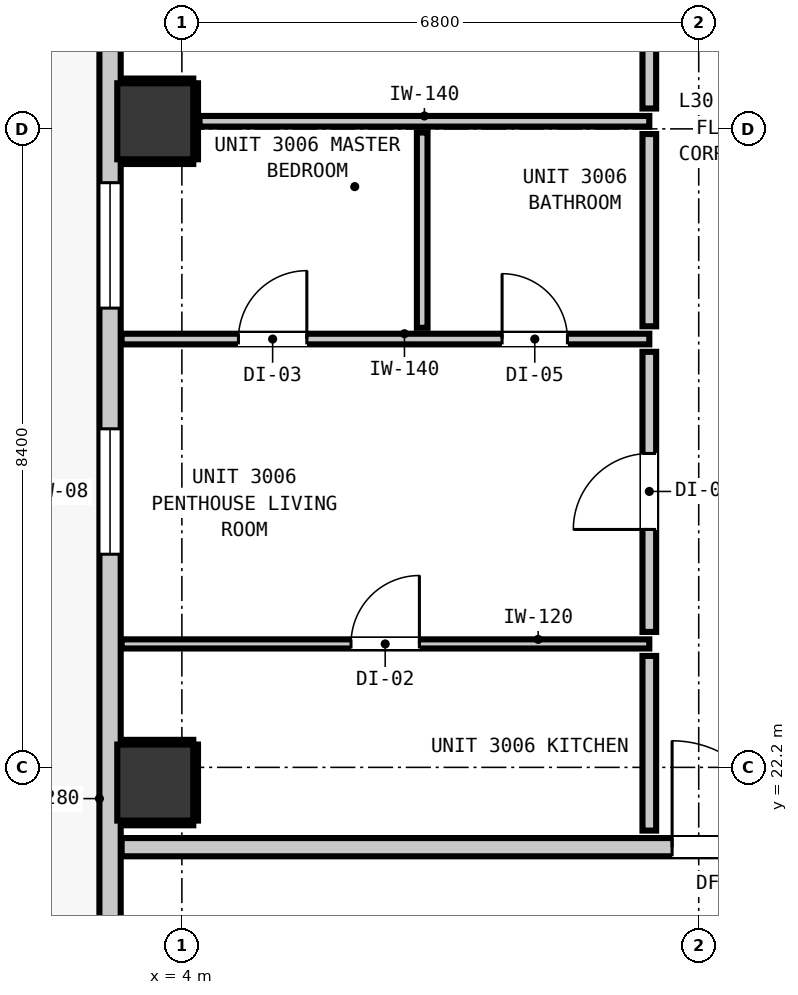
"""IFC4 building model, lengths in metres.
Left out: names, types, materials, properties, quantities, classifications, styles, units other than length and angle.
Written with IfcOpenShell. Run it as: python <this file> out.ifc"""

import sys

from ifc_helpers import new_model, si_unit, direction, frame, frame_2d, origin, origin_2d, place, context, subcontext, project, spatial, rectangle, extrude, element, fill, save


model = new_model("IFC4")
c1 = context("Model", 3, precision=1e-05, world=origin(), true_north=direction((0.0, 1.0)))
c2 = subcontext(c1, "Body", "Model", "MODEL_VIEW")
j1 = project(units=[si_unit("LENGTHUNIT", "METRE"), si_unit("PLANEANGLEUNIT", "RADIAN")], contexts=[c1])
p1 = place(None, origin())
s1 = spatial("IfcSite", under=j1, at=p1, CompositionType="ELEMENT")
p2 = place(p1, origin())
s2 = spatial("IfcBuilding", under=s1, at=p2, CompositionType="ELEMENT")
p3 = place(p2, frame((0.0, 0.0, 106.08)))
s3 = spatial("IfcBuildingStorey", under=s2, at=p3, CompositionType="ELEMENT", Elevation=106.08)
for number, where, z_axis, x_axis in (
    (1, (3.65, 22.0, -0.2), (0.0, 0.0, 1.0), (1.0, 0.0, 0.0)),
    (2, (3.65, 30.7, -0.2), (0.0, 0.0, 1.0), (1.0, 0.0, 0.0)),
):
    element("IfcColumn", number, at=place(p3, frame(where, z_axis=z_axis, x_axis=x_axis)), inside=s3, PredefinedType="COLUMN", context=c2, shape_type="SweptSolid", body=[
        extrude(rectangle(XDim=1.0, YDim=1.0, at=origin_2d()), origin(), (0.0, 0.0, 1.0), 3.52),
    ])
p4 = place(p3, frame((3.055, 11.355, 0.0), z_axis=(0.0, 0.0, 1.0), x_axis=(0.0, 1.0, 0.0)))
e3 = element("IfcWall", 3, at=p4, inside=s3, PredefinedType="STANDARD", context=c2, shape_type="SweptSolid", body=[
    extrude(rectangle(XDim=32.29, YDim=0.28, at=frame_2d((16.145, 0.0))), origin(), (0.0, 0.0, 1.0), 3.08),
])
p5 = place(p4, frame((6.119, 0.0, 0.0)))
e4 = element("IfcOpeningElement", 4, at=p5, cuts=e3, PredefinedType="OPENING", context=c2, shape_type="SweptSolid", body=[
    extrude(rectangle(XDim=1.1, YDim=2.15, at=frame_2d((0.55, 1.075))), frame((0.0, 0.15, 0.0), z_axis=(0.0, -1.0, 0.0), x_axis=(1.0, 0.0, 0.0)), (0.0, 0.0, 1.0), 0.3),
])
p6 = place(p4, frame((0.545, 0.0, 0.85)))
e5 = element("IfcOpeningElement", 5, at=p6, cuts=e3, PredefinedType="OPENING", context=c2, shape_type="SweptSolid", body=[
    extrude(rectangle(XDim=1.05, YDim=1.65, at=frame_2d((0.525, 0.825))), frame((0.0, 0.15, 0.0), z_axis=(0.0, -1.0, 0.0), x_axis=(1.0, 0.0, 0.0)), (0.0, 0.0, 1.0), 0.3),
])
p7 = place(p4, frame((13.649, 0.0, 0.85)))
e6 = element("IfcOpeningElement", 6, at=p7, cuts=e3, PredefinedType="OPENING", context=c2, shape_type="SweptSolid", body=[
    extrude(rectangle(XDim=1.65, YDim=1.75, at=frame_2d((0.825, 0.875))), frame((0.0, 0.15, 0.0), z_axis=(0.0, -1.0, 0.0), x_axis=(1.0, 0.0, 0.0)), (0.0, 0.0, 1.0), 0.3),
])
p8 = place(p4, frame((16.887, 0.0, 0.85)))
e7 = element("IfcOpeningElement", 7, at=p8, cuts=e3, PredefinedType="OPENING", context=c2, shape_type="SweptSolid", body=[
    extrude(rectangle(XDim=1.65, YDim=1.75, at=frame_2d((0.825, 0.875))), frame((0.0, 0.15, 0.0), z_axis=(0.0, -1.0, 0.0), x_axis=(1.0, 0.0, 0.0)), (0.0, 0.0, 1.0), 0.3),
])
p9 = place(p4, frame((23.2, 0.0, 0.85)))
e8 = element("IfcOpeningElement", 8, at=p9, cuts=e3, PredefinedType="OPENING", context=c2, shape_type="SweptSolid", body=[
    extrude(rectangle(XDim=1.65, YDim=1.75, at=frame_2d((0.825, 0.875))), frame((0.0, 0.15, 0.0), z_axis=(0.0, -1.0, 0.0), x_axis=(1.0, 0.0, 0.0)), (0.0, 0.0, 1.0), 0.3),
])
p10 = place(p4, frame((26.312, 0.0, 0.85)))
e9 = element("IfcOpeningElement", 9, at=p10, cuts=e3, PredefinedType="OPENING", context=c2, shape_type="SweptSolid", body=[
    extrude(rectangle(XDim=1.05, YDim=1.65, at=frame_2d((0.525, 0.825))), frame((0.0, 0.15, 0.0), z_axis=(0.0, -1.0, 0.0), x_axis=(1.0, 0.0, 0.0)), (0.0, 0.0, 1.0), 0.3),
])
p11 = place(p3, frame((3.207, 21.15, 0.0), z_axis=(0.0, 0.0, 1.0), x_axis=(1.0, 0.0, 0.0)))
e10 = element("IfcWall", 10, at=p11, inside=s3, PredefinedType="PARTITIONING", context=c2, shape_type="SweptSolid", body=[
    extrude(rectangle(XDim=39.386, YDim=0.24, at=frame_2d((19.693, 0.0))), origin(), (0.0, 0.0, 1.0), 3.08),
])
p12 = place(p11, frame((15.003, 0.0, 0.0)))
e11 = element("IfcOpeningElement", 11, at=p12, cuts=e10, PredefinedType="OPENING", context=c2, shape_type="SweptSolid", body=[
    extrude(rectangle(XDim=1.1, YDim=2.15, at=frame_2d((0.55, 1.075))), frame((0.0, 0.13, 0.0), z_axis=(0.0, -1.0, 0.0), x_axis=(1.0, 0.0, 0.0)), (0.0, 0.0, 1.0), 0.26),
])
p13 = place(p11, frame((7.243, 0.0, 0.0)))
e12 = element("IfcOpeningElement", 12, at=p13, cuts=e10, PredefinedType="OPENING", context=c2, shape_type="SweptSolid", body=[
    extrude(rectangle(XDim=1.4, YDim=2.15, at=frame_2d((0.7, 1.075))), frame((0.0, 0.13, 0.0), z_axis=(0.0, -1.0, 0.0), x_axis=(1.0, 0.0, 0.0)), (0.0, 0.0, 1.0), 0.26),
])
p14 = place(p11, frame((34.843, 0.0, 0.0)))
e13 = element("IfcOpeningElement", 13, at=p14, cuts=e10, PredefinedType="OPENING", context=c2, shape_type="SweptSolid", body=[
    extrude(rectangle(XDim=1.4, YDim=2.15, at=frame_2d((0.7, 1.075))), frame((0.0, 0.13, 0.0), z_axis=(0.0, -1.0, 0.0), x_axis=(1.0, 0.0, 0.0)), (0.0, 0.0, 1.0), 0.26),
])
p15 = place(p3, frame((3.207, 27.835, 0.0), z_axis=(0.0, 0.0, 1.0), x_axis=(1.0, 0.0, 0.0)))
e14 = element("IfcWall", 14, at=p15, inside=s3, PredefinedType="PARTITIONING", context=c2, shape_type="SweptSolid", body=[
    extrude(rectangle(XDim=6.943, YDim=0.14, at=frame_2d((3.471, 0.0))), origin(), (0.0, 0.0, 1.0), 3.08),
])
p16 = place(p15, frame((5.006, 0.0, 0.0)))
e15 = element("IfcOpeningElement", 15, at=p16, cuts=e14, PredefinedType="OPENING", context=c2, shape_type="SweptSolid", body=[
    extrude(rectangle(XDim=0.86, YDim=2.02, at=frame_2d((0.43, 1.01))), frame((0.0, 0.08, 0.0), z_axis=(0.0, -1.0, 0.0), x_axis=(1.0, 0.0, 0.0)), (0.0, 0.0, 1.0), 0.16),
])
p17 = place(p15, frame((1.537, 0.0, 0.0)))
e16 = element("IfcOpeningElement", 16, at=p17, cuts=e14, PredefinedType="OPENING", context=c2, shape_type="SweptSolid", body=[
    extrude(rectangle(XDim=0.9, YDim=2.1, at=frame_2d((0.45, 1.05))), frame((0.0, 0.08, 0.0), z_axis=(0.0, -1.0, 0.0), x_axis=(1.0, 0.0, 0.0)), (0.0, 0.0, 1.0), 0.16),
])
p18 = place(p3, frame((4.232, 30.7, 0.0), z_axis=(0.0, 0.0, 1.0), x_axis=(1.0, 0.0, 0.0)))
e17 = element("IfcWall", 17, at=p18, inside=s3, PredefinedType="PARTITIONING", context=c2, shape_type="SweptSolid", body=[
    extrude(rectangle(XDim=5.918, YDim=0.14, at=frame_2d((2.959, 0.0))), origin(), (0.0, 0.0, 1.0), 2.315),
])
p19 = place(p3, frame((3.207, 23.824, 0.0), z_axis=(0.0, 0.0, 1.0), x_axis=(1.0, 0.0, 0.0)))
e18 = element("IfcWall", 18, at=p19, inside=s3, PredefinedType="PARTITIONING", context=c2, shape_type="SweptSolid", body=[
    extrude(rectangle(XDim=6.943, YDim=0.12, at=frame_2d((3.471, 0.0))), origin(), (0.0, 0.0, 1.0), 3.08),
])
p20 = place(p19, frame((3.018, 0.0, 0.0)))
e19 = element("IfcOpeningElement", 19, at=p20, cuts=e18, PredefinedType="OPENING", context=c2, shape_type="SweptSolid", body=[
    extrude(rectangle(XDim=0.9, YDim=2.1, at=frame_2d((0.45, 1.05))), frame((0.0, 0.07, 0.0), z_axis=(0.0, -1.0, 0.0), x_axis=(1.0, 0.0, 0.0)), (0.0, 0.0, 1.0), 0.14),
])
p21 = place(p3, frame((10.15, 21.368, 0.0), z_axis=(0.0, 0.0, 1.0), x_axis=(0.0, 1.0, 0.0)))
e20 = element("IfcWall", 20, at=p21, inside=s3, PredefinedType="PARTITIONING", context=c2, shape_type="SweptSolid", body=[
    extrude(rectangle(XDim=2.298, YDim=0.18, at=frame_2d((1.149, 0.0))), origin(), (0.0, 0.0, 1.0), 3.08),
])
p22 = place(p3, frame((10.15, 23.982, 0.0), z_axis=(0.0, 0.0, 1.0), x_axis=(0.0, 1.0, 0.0)))
e21 = element("IfcWall", 21, at=p22, inside=s3, PredefinedType="PARTITIONING", context=c2, shape_type="SweptSolid", body=[
    extrude(rectangle(XDim=3.685, YDim=0.18, at=frame_2d((1.843, 0.0))), origin(), (0.0, 0.0, 1.0), 3.08),
])
p23 = place(p22, frame((1.348, 0.0, 0.0)))
e22 = element("IfcOpeningElement", 22, at=p23, cuts=e21, PredefinedType="OPENING", context=c2, shape_type="SweptSolid", body=[
    extrude(rectangle(XDim=1.0, YDim=2.15, at=frame_2d((0.5, 1.075))), frame((0.0, 0.1, 0.0), z_axis=(0.0, -1.0, 0.0), x_axis=(1.0, 0.0, 0.0)), (0.0, 0.0, 1.0), 0.2),
])
p24 = place(p3, frame((10.15, 28.003, 0.0), z_axis=(0.0, 0.0, 1.0), x_axis=(0.0, 1.0, 0.0)))
e23 = element("IfcWall", 23, at=p24, inside=s3, PredefinedType="PARTITIONING", context=c2, shape_type="SweptSolid", body=[
    extrude(rectangle(XDim=2.529, YDim=0.18, at=frame_2d((1.265, 0.0))), origin(), (0.0, 0.0, 1.0), 3.08),
])
p25 = place(p3, frame((10.15, 30.868, 0.0), z_axis=(0.0, 0.0, 1.0), x_axis=(0.0, 1.0, 0.0)))
e24 = element("IfcWall", 24, at=p25, inside=s3, PredefinedType="PARTITIONING", context=c2, shape_type="SweptSolid", body=[
    extrude(rectangle(XDim=2.348, YDim=0.18, at=frame_2d((1.174, 0.0))), origin(), (0.0, 0.0, 1.0), 3.08),
])
p26 = place(p3, frame((7.162, 27.983, 0.0), z_axis=(0.0, 0.0, 1.0), x_axis=(0.0, 1.0, 0.0)))
e25 = element("IfcWall", 25, at=p26, inside=s3, PredefinedType="PARTITIONING", context=c2, shape_type="SweptSolid", body=[
    extrude(rectangle(XDim=2.569, YDim=0.14, at=frame_2d((1.285, 0.0))), origin(), (0.0, 0.0, 1.0), 3.08),
])
for number, where, z_axis, x_axis in (
    (26, (3.21, 21.468, 0.0), (0.0, 0.0, 1.0), (1.0, 0.0, 0.0)),
    (27, (3.21, 22.532, 0.0), (0.0, 0.0, 1.0), (1.0, 0.0, 0.0)),
):
    element("IfcWall", number, at=place(p3, frame(where, z_axis=z_axis, x_axis=x_axis)), inside=s3, PredefinedType="PARTITIONING", context=c2, shape_type="SweptSolid", body=[
        extrude(rectangle(XDim=0.94, YDim=0.06, at=frame_2d((0.47, 0.0))), origin(), (0.0, 0.0, 1.0), 1.45),
    ])
p27 = place(p3, frame((4.182, 21.5, 0.0), z_axis=(0.0, 0.0, 1.0), x_axis=(0.0, 1.0, 0.0)))
e28 = element("IfcWall", 28, at=p27, inside=s3, PredefinedType="PARTITIONING", context=c2, shape_type="SweptSolid", body=[
    extrude(rectangle(XDim=1.0, YDim=0.06, at=frame_2d((0.5, 0.0))), origin(), (0.0, 0.0, 1.0), 1.45),
])
for number, where, z_axis, x_axis in (
    (29, (3.21, 30.168, 0.0), (0.0, 0.0, 1.0), (1.0, 0.0, 0.0)),
    (30, (3.21, 31.232, 0.0), (0.0, 0.0, 1.0), (1.0, 0.0, 0.0)),
):
    element("IfcWall", number, at=place(p3, frame(where, z_axis=z_axis, x_axis=x_axis)), inside=s3, PredefinedType="PARTITIONING", context=c2, shape_type="SweptSolid", body=[
        extrude(rectangle(XDim=0.94, YDim=0.06, at=frame_2d((0.47, 0.0))), origin(), (0.0, 0.0, 1.0), 1.45),
    ])
p28 = place(p3, frame((4.182, 30.2, 0.0), z_axis=(0.0, 0.0, 1.0), x_axis=(0.0, 1.0, 0.0)))
e31 = element("IfcWall", 31, at=p28, inside=s3, PredefinedType="PARTITIONING", context=c2, shape_type="SweptSolid", body=[
    extrude(rectangle(XDim=1.0, YDim=0.06, at=frame_2d((0.5, 0.0))), origin(), (0.0, 0.0, 1.0), 1.45),
])
p29 = place(p7, origin())
e32 = element("IfcWindow", 32, at=p29, inside=s3, PartitioningType="SINGLE_PANEL", PredefinedType="WINDOW", context=c2, shape_type="SweptSolid", body=[
    extrude(rectangle(XDim=1.65, YDim=1.75, at=frame_2d((0.825, 0.875))), frame((0.0, 0.03, 0.0), z_axis=(0.0, -1.0, 0.0), x_axis=(1.0, 0.0, 0.0)), (0.0, 0.0, 1.0), 0.06),
])
fill(e6, e32)
p30 = place(p8, origin())
e33 = element("IfcWindow", 33, at=p30, inside=s3, PartitioningType="SINGLE_PANEL", PredefinedType="WINDOW", context=c2, shape_type="SweptSolid", body=[
    extrude(rectangle(XDim=1.65, YDim=1.75, at=frame_2d((0.825, 0.875))), frame((0.0, 0.03, 0.0), z_axis=(0.0, -1.0, 0.0), x_axis=(1.0, 0.0, 0.0)), (0.0, 0.0, 1.0), 0.06),
])
fill(e7, e33)
p31 = place(p13, origin())
e34 = element("IfcDoor", 34, at=p31, inside=s3, OperationType="SINGLE_SWING_LEFT", PredefinedType="DOOR", context=c2, shape_type="SweptSolid", body=[
    extrude(rectangle(XDim=1.4, YDim=2.15, at=frame_2d((0.7, 1.075))), frame((0.0, 0.025, 0.0), z_axis=(0.0, -1.0, 0.0), x_axis=(1.0, 0.0, 0.0)), (0.0, 0.0, 1.0), 0.05),
])
fill(e12, e34)
p32 = place(p23, origin())
e35 = element("IfcDoor", 35, at=p32, inside=s3, OperationType="SINGLE_SWING_LEFT", PredefinedType="DOOR", context=c2, shape_type="SweptSolid", body=[
    extrude(rectangle(XDim=1.0, YDim=2.15, at=frame_2d((0.5, 1.075))), frame((0.0, 0.025, 0.0), z_axis=(0.0, -1.0, 0.0), x_axis=(1.0, 0.0, 0.0)), (0.0, 0.0, 1.0), 0.05),
])
fill(e22, e35)
p33 = place(p20, origin())
e36 = element("IfcDoor", 36, at=p33, inside=s3, OperationType="SINGLE_SWING_RIGHT", PredefinedType="DOOR", context=c2, shape_type="SweptSolid", body=[
    extrude(rectangle(XDim=0.9, YDim=2.1, at=frame_2d((0.45, 1.05))), frame((0.0, 0.025, 0.0), z_axis=(0.0, -1.0, 0.0), x_axis=(1.0, 0.0, 0.0)), (0.0, 0.0, 1.0), 0.05),
])
fill(e19, e36)
p34 = place(p16, origin())
e37 = element("IfcDoor", 37, at=p34, inside=s3, OperationType="SINGLE_SWING_LEFT", PredefinedType="DOOR", context=c2, shape_type="SweptSolid", body=[
    extrude(rectangle(XDim=0.86, YDim=2.02, at=frame_2d((0.43, 1.01))), frame((0.0, 0.025, 0.0), z_axis=(0.0, -1.0, 0.0), x_axis=(1.0, 0.0, 0.0)), (0.0, 0.0, 1.0), 0.05),
])
fill(e15, e37)
p35 = place(p17, origin())
e38 = element("IfcDoor", 38, at=p35, inside=s3, OperationType="SINGLE_SWING_RIGHT", PredefinedType="DOOR", context=c2, shape_type="SweptSolid", body=[
    extrude(rectangle(XDim=0.9, YDim=2.1, at=frame_2d((0.45, 1.05))), frame((0.0, 0.025, 0.0), z_axis=(0.0, -1.0, 0.0), x_axis=(1.0, 0.0, 0.0)), (0.0, 0.0, 1.0), 0.05),
])
fill(e16, e38)
save(model, sys.argv[1])
